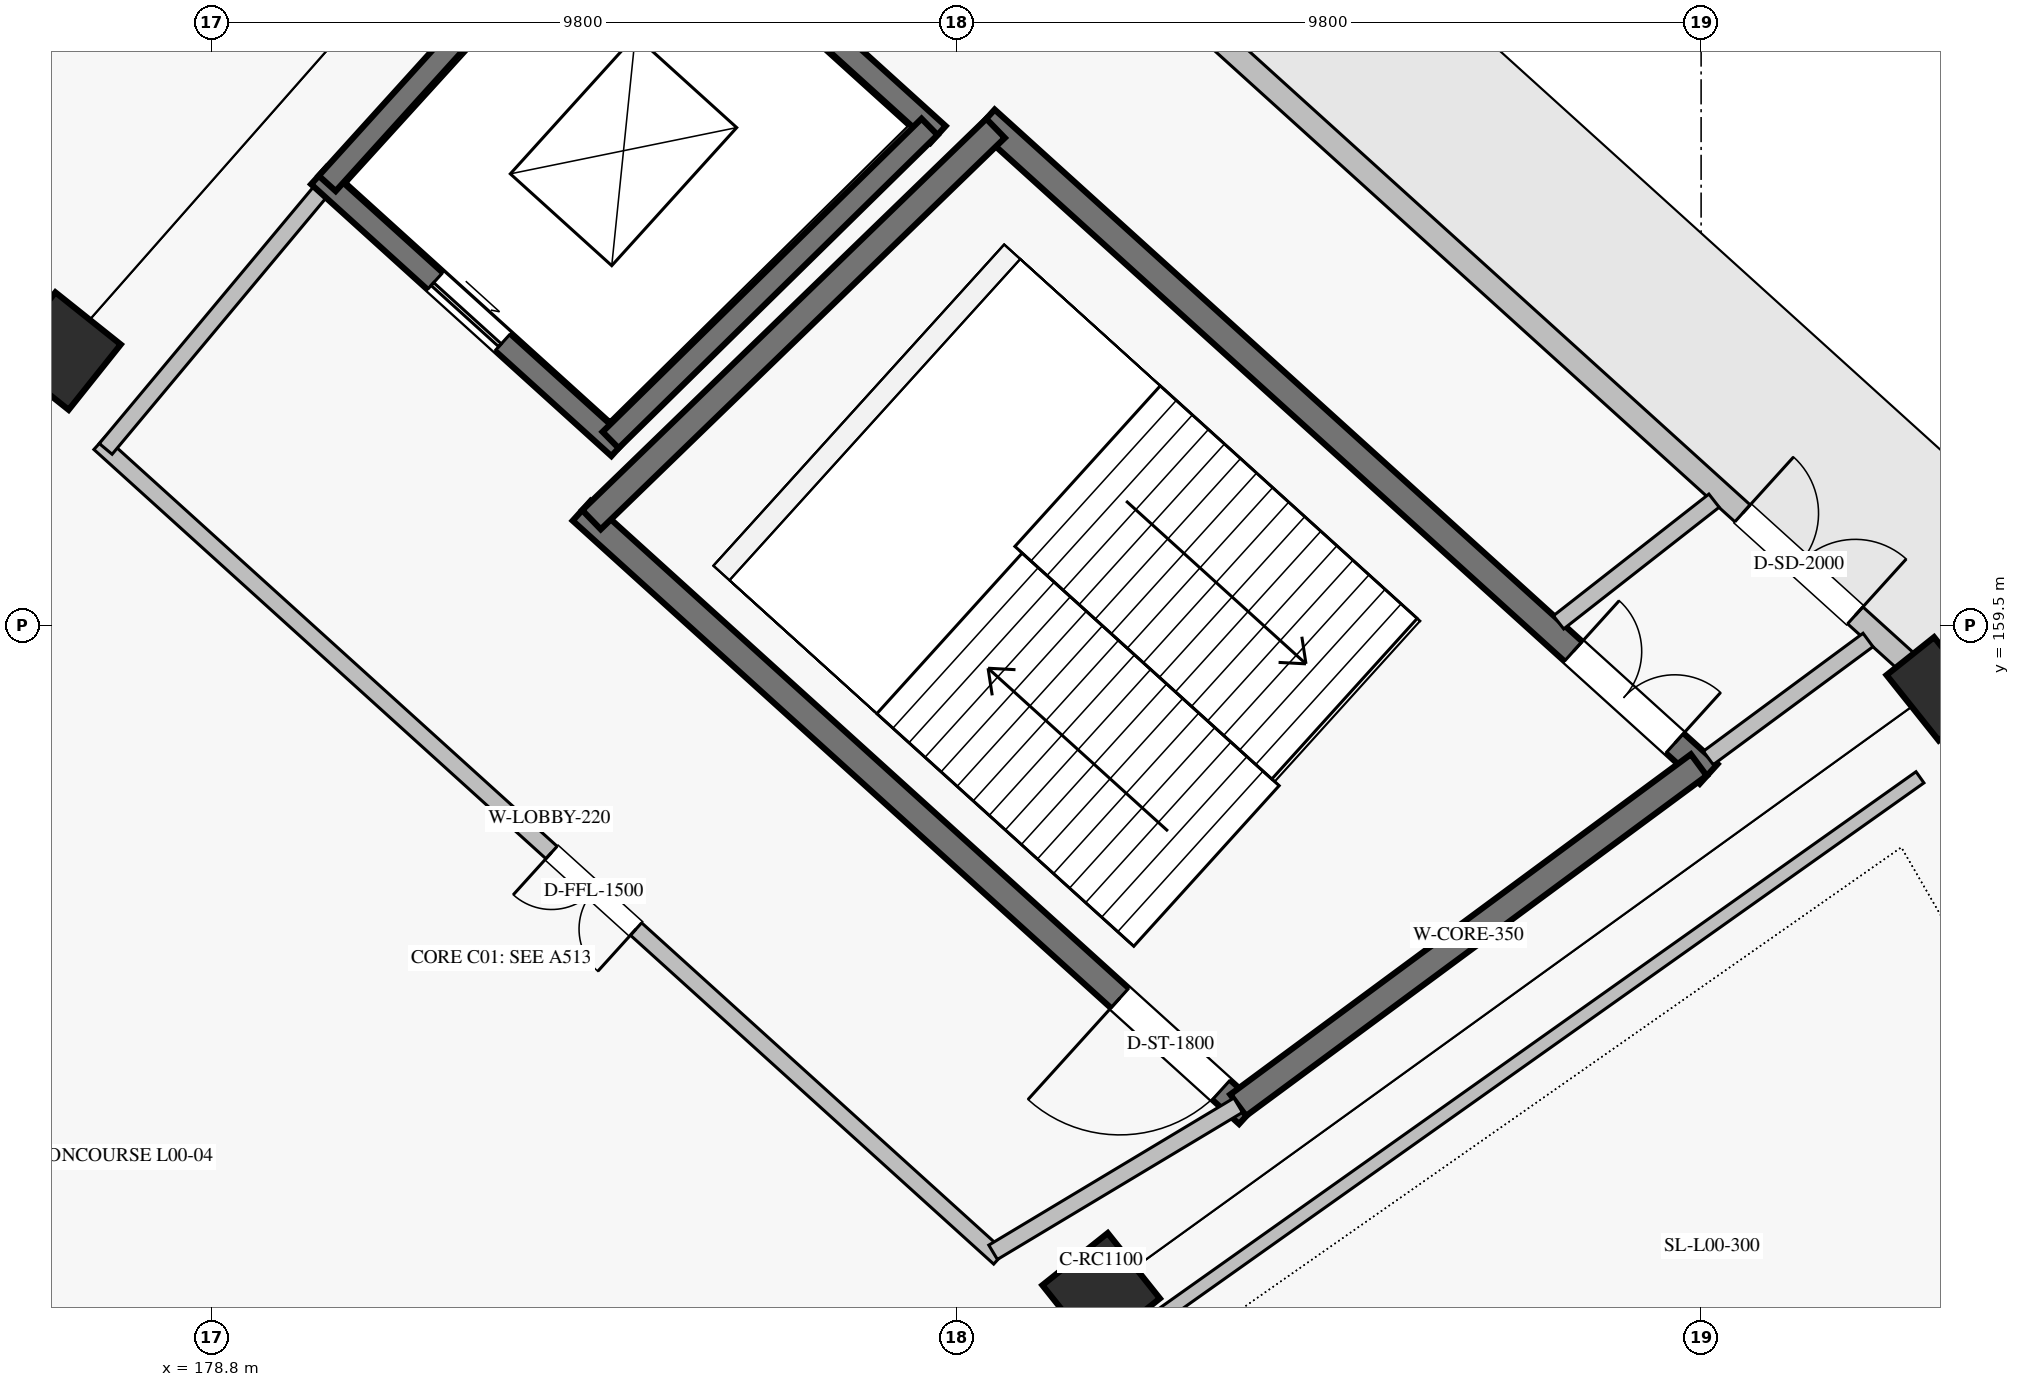
"""IFC4 building model, lengths in metres.
Left out: names, types, materials, properties, quantities, classifications, styles, units other than length and angle.
Written with IfcOpenShell. Run it as: python <this file> out.ifc"""

import sys

from ifc_helpers import new_model, si_unit, direction, frame, frame_2d, origin, origin_2d, place, context, subcontext, project, spatial, rectangle, extrude, element, fill, save


model = new_model("IFC4")
c1 = context("Model", 3, precision=1e-05, world=origin(), true_north=direction((0.0, 1.0)))
c2 = subcontext(c1, "Body", "Model", "MODEL_VIEW")
j1 = project(units=[si_unit("LENGTHUNIT", "METRE"), si_unit("PLANEANGLEUNIT", "RADIAN")], contexts=[c1])
p1 = place(None, origin())
s1 = spatial("IfcSite", under=j1, at=p1, CompositionType="ELEMENT")
p2 = place(p1, origin())
s2 = spatial("IfcBuilding", under=s1, at=p2, CompositionType="ELEMENT")
p3 = place(p2, origin())
s3 = spatial("IfcBuildingStorey", under=s2, at=p3, CompositionType="ELEMENT", Elevation=0.0)
for number, where, z_axis, x_axis in (
    (1, (190.506, 150.734, 0.0), (0.0, 0.0, 1.0), (0.782, 0.623, 0.0)),
    (2, (176.834, 163.111, 0.0), (0.0, 0.0, 1.0), (0.623, 0.782, 0.0)),
):
    element("IfcColumn", number, at=place(p3, frame(where, z_axis=z_axis, x_axis=x_axis)), inside=s3, PredefinedType="COLUMN", context=c2, shape_type="SweptSolid", body=[
        extrude(rectangle(XDim=1.1, YDim=1.1, at=origin_2d()), origin(), (0.0, 0.0, 1.0), 5.78),
    ])
p4 = place(p3, frame((201.495, 158.668, 0.0), z_axis=(0.0, 0.0, 1.0), x_axis=(0.781831482473, 0.623489801853, 0.0)))
e3 = element("IfcColumn", 3, at=p4, inside=s3, PredefinedType="COLUMN", context=c2, shape_type="SweptSolid", body=[
    extrude(rectangle(XDim=0.8, YDim=1.1, at=origin_2d()), origin(), (0.0, 0.0, 1.0), 5.78),
])
p5 = place(p3, frame((201.206, 158.929, 0.0), z_axis=(0.0, 0.0, 1.0), x_axis=(-0.741354093053, 0.671114080253, 0.0)))
e4 = element("IfcWall", 4, at=p5, inside=s3, PredefinedType="SOLIDWALL", context=c2, shape_type="SweptSolid", body=[
    extrude(rectangle(XDim=20.664, YDim=0.3, at=frame_2d((10.332, 0.0))), origin(), (0.0, 0.0, 1.0), 4.8),
])
p6 = place(p5, frame((1.05, 0.0, 0.0)))
e5 = element("IfcOpeningElement", 5, at=p6, cuts=e4, PredefinedType="OPENING", context=c2, shape_type="SweptSolid", body=[
    extrude(rectangle(XDim=2.0, YDim=2.3, at=frame_2d((1.0, 1.15))), frame((0.0, 0.16, 0.0), z_axis=(0.0, -1.0, 0.0), x_axis=(1.0, 0.0, 0.0)), (0.0, 0.0, 1.0), 0.32),
])
p7 = place(p3, frame((192.439, 153.072, 0.0), z_axis=(0.0, 0.0, 1.0), x_axis=(-0.741358227035, 0.671109513572, 0.0)))
e6 = element("IfcWall", 6, at=p7, inside=s3, PredefinedType="SHEAR", context=c2, shape_type="SweptSolid", body=[
    extrude(rectangle(XDim=11.827, YDim=0.35, at=frame_2d((5.913, 0.0))), origin(), (0.0, 0.0, 1.0), 5.5),
])
p8 = place(p7, frame((0.475, 0.0, 0.0)))
e7 = element("IfcOpeningElement", 7, at=p8, cuts=e6, PredefinedType="OPENING", context=c2, shape_type="SweptSolid", body=[
    extrude(rectangle(XDim=1.8, YDim=2.2, at=frame_2d((0.9, 1.1))), frame((0.0, 0.185, 0.0), z_axis=(0.0, -1.0, 0.0), x_axis=(1.0, 0.0, 0.0)), (0.0, 0.0, 1.0), 0.37),
])
p9 = place(p3, frame((198.499, 157.548, 0.0), z_axis=(0.0, 0.0, 1.0), x_axis=(-0.741351373721, 0.671117084183, 0.0)))
e8 = element("IfcWall", 8, at=p9, inside=s3, PredefinedType="SHEAR", context=c2, shape_type="SweptSolid", body=[
    extrude(rectangle(XDim=12.83, YDim=0.35, at=frame_2d((6.415, 0.0))), origin(), (0.0, 0.0, 1.0), 5.5),
])
p10 = place(p9, frame((0.602, 0.0, 0.0)))
e9 = element("IfcOpeningElement", 9, at=p10, cuts=e8, PredefinedType="OPENING", context=c2, shape_type="SweptSolid", body=[
    extrude(rectangle(XDim=1.8, YDim=2.2, at=frame_2d((0.9, 1.1))), frame((0.0, 0.185, 0.0), z_axis=(0.0, -1.0, 0.0), x_axis=(1.0, 0.0, 0.0)), (0.0, 0.0, 1.0), 0.37),
])
p11 = place(p3, frame((198.494, 157.758, 0.0), z_axis=(0.0, 0.0, 1.0), x_axis=(0.804407162525, 0.59407837604, 0.0)))
e10 = element("IfcWall", 10, at=p11, inside=s3, PredefinedType="SOLIDWALL", context=c2, shape_type="SweptSolid", body=[
    extrude(rectangle(XDim=2.613, YDim=0.22, at=frame_2d((1.306, 0.0))), origin(), (0.0, 0.0, 1.0), 5.5),
])
p12 = place(p3, frame((196.524, 159.542, 0.0), z_axis=(0.0, 0.0, 1.0), x_axis=(0.787481201748, 0.616338670613, 0.0)))
e11 = element("IfcWall", 11, at=p12, inside=s3, PredefinedType="SOLIDWALL", context=c2, shape_type="SweptSolid", body=[
    extrude(rectangle(XDim=2.598, YDim=0.22, at=frame_2d((1.299, 0.0))), origin(), (0.0, 0.0, 1.0), 5.5),
])
p13 = place(p3, frame((192.309, 153.189, 0.0), z_axis=(0.0, 0.0, 1.0), x_axis=(0.804395625347, 0.594093997548, 0.0)))
e12 = element("IfcWall", 12, at=p13, inside=s3, PredefinedType="SHEAR", context=c2, shape_type="SweptSolid", body=[
    extrude(rectangle(XDim=7.534, YDim=0.35, at=frame_2d((3.767, 0.0))), origin(), (0.0, 0.0, 1.0), 5.5),
])
p14 = place(p3, frame((183.801, 160.892, 0.0), z_axis=(0.0, 0.0, 1.0), x_axis=(0.718297398554, 0.69573619083, 0.0)))
e13 = element("IfcWall", 13, at=p14, inside=s3, PredefinedType="SHEAR", context=c2, shape_type="SweptSolid", body=[
    extrude(rectangle(XDim=7.402, YDim=0.35, at=frame_2d((3.701, 0.0))), origin(), (0.0, 0.0, 1.0), 5.5),
])
p15 = place(p3, frame((184.163, 161.841, 0.0), z_axis=(0.0, 0.0, 1.0), x_axis=(-0.741350155641, 0.671118429736, 0.0)))
e14 = element("IfcWall", 14, at=p15, inside=s3, PredefinedType="SHEAR", context=c2, shape_type="SweptSolid", body=[
    extrude(rectangle(XDim=5.329, YDim=0.3, at=frame_2d((2.665, 0.0))), origin(), (0.0, 0.0, 1.0), 5.5),
])
p16 = place(p15, frame((2.065, 0.0, 0.0)))
e15 = element("IfcOpeningElement", 15, at=p16, cuts=e14, PredefinedType="OPENING", context=c2, shape_type="SweptSolid", body=[
    extrude(rectangle(XDim=1.2, YDim=2.2, at=frame_2d((0.6, 1.1))), frame((0.0, 0.16, 0.0), z_axis=(0.0, -1.0, 0.0), x_axis=(1.0, 0.0, 0.0)), (0.0, 0.0, 1.0), 0.32),
])
p17 = place(p3, frame((188.36, 165.961, 0.0), z_axis=(0.0, 0.0, 1.0), x_axis=(-0.74134208775, 0.671127341815, 0.0)))
e16 = element("IfcWall", 16, at=p17, inside=s3, PredefinedType="SHEAR", context=c2, shape_type="SweptSolid", body=[
    extrude(rectangle(XDim=5.675, YDim=0.3, at=frame_2d((2.837, 0.0))), origin(), (0.0, 0.0, 1.0), 5.5),
])
p18 = place(p3, frame((184.052, 161.941, 0.0), z_axis=(0.0, 0.0, 1.0), x_axis=(0.713553028001, 0.700601224828, 0.0)))
e17 = element("IfcWall", 17, at=p18, inside=s3, PredefinedType="SHEAR", context=c2, shape_type="SweptSolid", body=[
    extrude(rectangle(XDim=5.881, YDim=0.3, at=frame_2d((2.94, 0.0))), origin(), (0.0, 0.0, 1.0), 5.5),
])
p19 = place(p3, frame((180.324, 165.316, 0.0), z_axis=(0.0, 0.0, 1.0), x_axis=(0.67115829282, 0.741314067031, 0.0)))
e18 = element("IfcWall", 18, at=p19, inside=s3, PredefinedType="SHEAR", context=c2, shape_type="SweptSolid", body=[
    extrude(rectangle(XDim=5.871, YDim=0.3, at=frame_2d((2.935, 0.0))), origin(), (0.0, 0.0, 1.0), 5.5),
])
p20 = place(p3, frame((189.166, 151.181, 0.0), z_axis=(0.0, 0.0, 1.0), x_axis=(-0.741351035574, 0.671117457717, 0.0)))
e19 = element("IfcWall", 19, at=p20, inside=s3, PredefinedType="SOLIDWALL", context=c2, shape_type="SweptSolid", body=[
    extrude(rectangle(XDim=15.969, YDim=0.22, at=frame_2d((7.985, 0.0))), origin(), (0.0, 0.0, 1.0), 5.5),
])
p21 = place(p20, frame((6.447, 0.0, 0.0)))
e20 = element("IfcOpeningElement", 20, at=p21, cuts=e19, PredefinedType="OPENING", context=c2, shape_type="SweptSolid", body=[
    extrude(rectangle(XDim=1.5, YDim=2.2, at=frame_2d((0.75, 1.1))), frame((0.0, 0.12, 0.0), z_axis=(0.0, -1.0, 0.0), x_axis=(1.0, 0.0, 0.0)), (0.0, 0.0, 1.0), 0.24),
])
p22 = place(p3, frame((189.085, 151.254, 0.0), z_axis=(0.0, 0.0, 1.0), x_axis=(0.857424171966, 0.514610327654, 0.0)))
e21 = element("IfcWall", 21, at=p22, inside=s3, PredefinedType="SOLIDWALL", context=c2, shape_type="SweptSolid", body=[
    extrude(rectangle(XDim=3.76, YDim=0.22, at=frame_2d((1.88, 0.0))), origin(), (0.0, 0.0, 1.0), 5.5),
])
p23 = place(p3, frame((177.409, 161.824, 0.0), z_axis=(0.0, 0.0, 1.0), x_axis=(0.640759627034, 0.767741558315, 0.0)))
e22 = element("IfcWall", 22, at=p23, inside=s3, PredefinedType="SOLIDWALL", context=c2, shape_type="SweptSolid", body=[
    extrude(rectangle(XDim=4.549, YDim=0.22, at=frame_2d((2.274, 0.0))), origin(), (0.0, 0.0, 1.0), 5.5),
])
p24 = place(p3, frame((191.179, 150.342, 0.0), z_axis=(0.0, 0.0, 1.0), x_axis=(0.815753527099, 0.578399674122, 0.0)))
e23 = element("IfcWall", 23, at=p24, inside=s3, PredefinedType="PARTITIONING", context=c2, shape_type="SweptSolid", body=[
    extrude(rectangle(XDim=12.382, YDim=0.18, at=frame_2d((6.191, 0.0))), origin(), (0.0, 0.0, 1.0), 4.82),
])
p25 = place(p3, frame((170.073, 166.727, 0.0), z_axis=(0.0, 0.0, 1.0), x_axis=(0.588160679051, 0.808744097733, 0.0)))
e24 = element("IfcWall", 24, at=p25, inside=s3, PredefinedType="PARTITIONING", context=c2, shape_type="SweptSolid", body=[
    extrude(rectangle(XDim=11.857, YDim=0.18, at=frame_2d((5.929, 0.0))), origin(), (0.0, 0.0, 1.0), 4.82),
])
p26 = place(p6, frame((2.0, 0.0, 0.0), z_axis=(0.0, 0.0, 1.0), x_axis=(-1.0, 0.0, 0.0)))
e25 = element("IfcDoor", 25, at=p26, inside=s3, OperationType="DOUBLE_DOOR_SINGLE_SWING", PredefinedType="DOOR", context=c2, shape_type="SweptSolid", body=[
    extrude(rectangle(XDim=2.0, YDim=2.3, at=frame_2d((1.0, 1.15))), frame((0.0, 0.025, 0.0), z_axis=(0.0, -1.0, 0.0), x_axis=(1.0, 0.0, 0.0)), (0.0, 0.0, 1.0), 0.05),
])
fill(e5, e25)
p27 = place(p10, frame((1.8, 0.0, 0.0), z_axis=(0.0, 0.0, 1.0), x_axis=(-1.0, 0.0, 0.0)))
e26 = element("IfcDoor", 26, at=p27, inside=s3, OperationType="DOUBLE_DOOR_SINGLE_SWING", PredefinedType="DOOR", context=c2, shape_type="SweptSolid", body=[
    extrude(rectangle(XDim=1.8, YDim=2.2, at=frame_2d((0.9, 1.1))), frame((0.0, 0.025, 0.0), z_axis=(0.0, -1.0, 0.0), x_axis=(1.0, 0.0, 0.0)), (0.0, 0.0, 1.0), 0.05),
])
fill(e9, e26)
p28 = place(p8, origin())
e27 = element("IfcDoor", 27, at=p28, inside=s3, OperationType="SINGLE_SWING_RIGHT", PredefinedType="DOOR", context=c2, shape_type="SweptSolid", body=[
    extrude(rectangle(XDim=1.8, YDim=2.2, at=frame_2d((0.9, 1.1))), frame((0.0, 0.025, 0.0), z_axis=(0.0, -1.0, 0.0), x_axis=(1.0, 0.0, 0.0)), (0.0, 0.0, 1.0), 0.05),
])
fill(e7, e27)
p29 = place(p16, origin())
e28 = element("IfcDoor", 28, at=p29, inside=s3, OperationType="SLIDING_TO_LEFT", PredefinedType="DOOR", context=c2, shape_type="SweptSolid", body=[
    extrude(rectangle(XDim=1.2, YDim=2.2, at=frame_2d((0.6, 1.1))), frame((0.0, 0.025, 0.0), z_axis=(0.0, -1.0, 0.0), x_axis=(1.0, 0.0, 0.0)), (0.0, 0.0, 1.0), 0.05),
])
fill(e15, e28)
p30 = place(p21, origin())
e29 = element("IfcDoor", 29, at=p30, inside=s3, OperationType="DOUBLE_DOOR_SINGLE_SWING", PredefinedType="DOOR", context=c2, shape_type="SweptSolid", body=[
    extrude(rectangle(XDim=1.5, YDim=2.2, at=frame_2d((0.75, 1.1))), frame((0.0, 0.025, 0.0), z_axis=(0.0, -1.0, 0.0), x_axis=(1.0, 0.0, 0.0)), (0.0, 0.0, 1.0), 0.05),
])
fill(e20, e29)
save(model, sys.argv[1])
